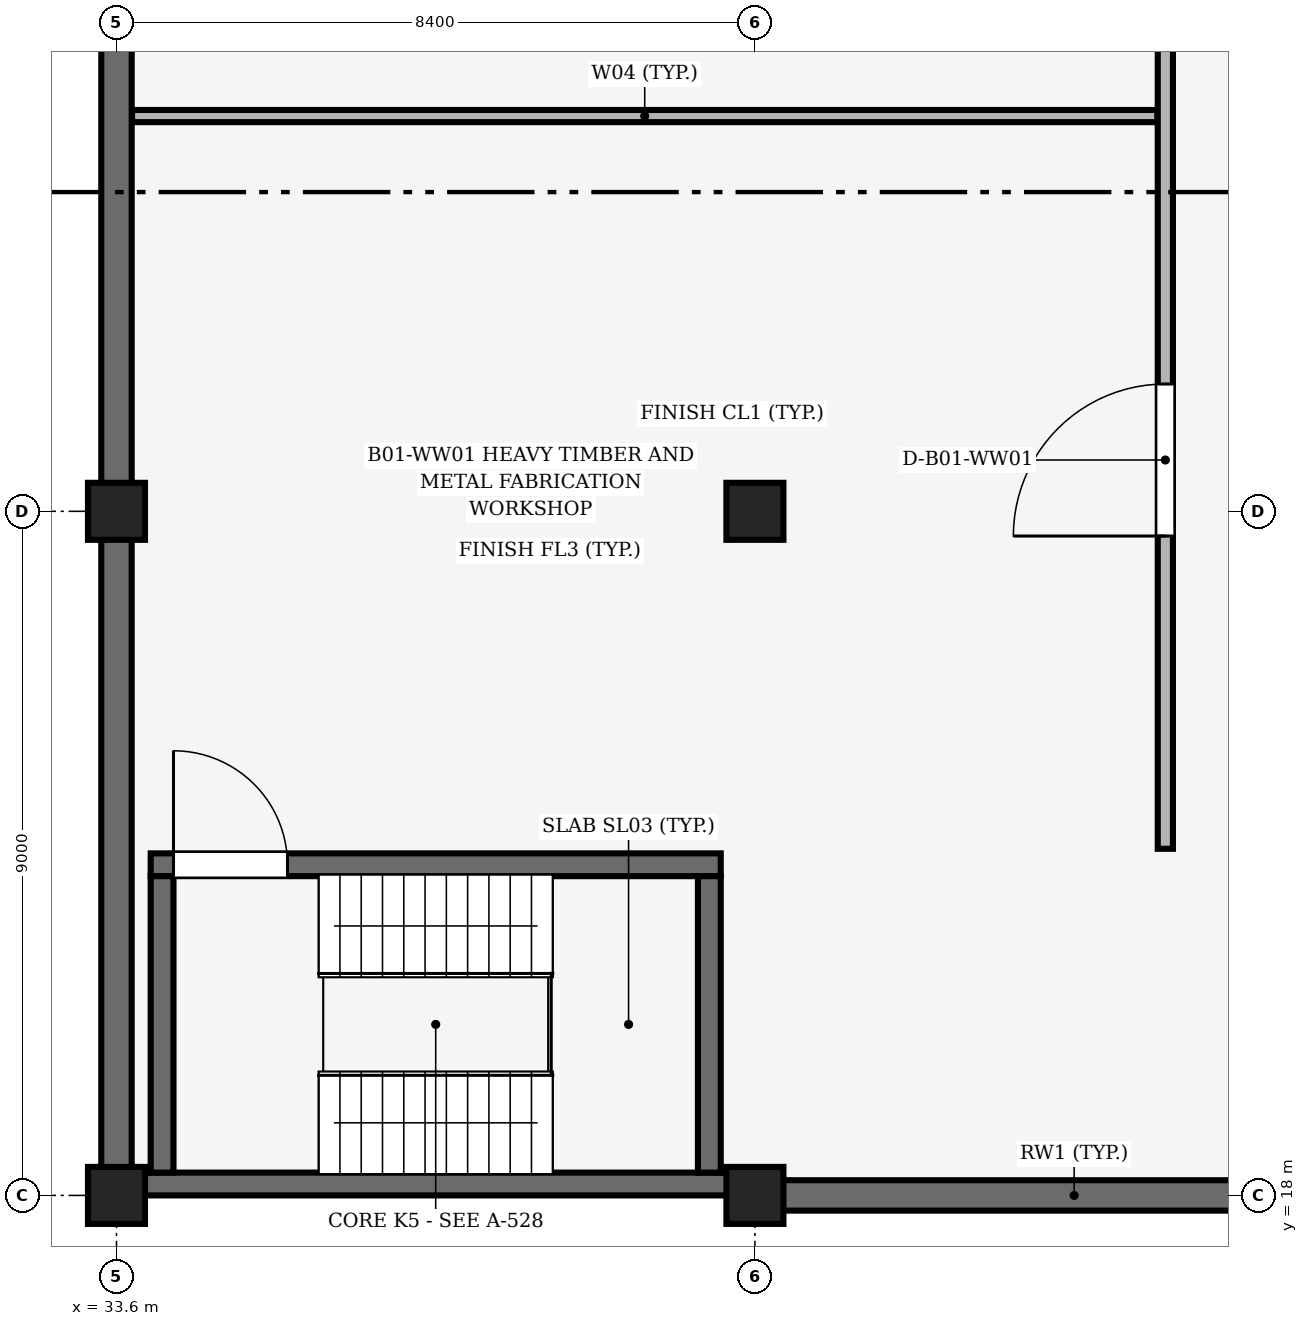
"""IFC4 building model, lengths in metres.
Left out: names, types, materials, properties, quantities, classifications, styles, units other than length and angle.
Written with IfcOpenShell. Run it as: python <this file> out.ifc"""

import sys

from ifc_helpers import new_model, si_unit, direction, frame, frame_2d, origin, origin_2d, place, context, subcontext, project, spatial, rectangle, extrude, element, fill, save


model = new_model("IFC4")
c1 = context("Model", 3, precision=1e-05, world=origin(), true_north=direction((0.0, 1.0)))
c2 = subcontext(c1, "Body", "Model", "MODEL_VIEW")
j1 = project(units=[si_unit("LENGTHUNIT", "METRE"), si_unit("PLANEANGLEUNIT", "RADIAN")], contexts=[c1])
p1 = place(None, origin())
s1 = spatial("IfcSite", under=j1, at=p1, CompositionType="ELEMENT")
p2 = place(p1, origin())
s2 = spatial("IfcBuilding", under=s1, at=p2, CompositionType="ELEMENT")
p3 = place(p2, frame((0.0, 0.0, -4.2)))
s3 = spatial("IfcBuildingStorey", under=s2, at=p3, CompositionType="ELEMENT", Elevation=-4.2)
for number, where, z_axis, x_axis in (
    (1, (33.6, 18.0, 0.0), (0.0, 0.0, 1.0), (1.0, 0.0, 0.0)),
    (2, (33.6, 27.0, 0.0), (0.0, 0.0, 1.0), (1.0, 0.0, 0.0)),
    (3, (42.0, 18.0, 0.0), (0.0, 0.0, 1.0), (1.0, 0.0, 0.0)),
    (4, (42.0, 27.0, 0.0), (0.0, 0.0, 1.0), (1.0, 0.0, 0.0)),
):
    element("IfcColumn", number, at=place(p3, frame(where, z_axis=z_axis, x_axis=x_axis)), inside=s3, PredefinedType="COLUMN", context=c2, shape_type="SweptSolid", body=[
        extrude(rectangle(XDim=0.75, YDim=0.75, at=origin_2d()), origin(), (0.0, 0.0, 1.0), 4.2),
    ])
p4 = place(p3, frame((42.35, 18.0, 0.0), z_axis=(0.0, 0.0, 1.0), x_axis=(1.0, 0.0, 0.0)))
e5 = element("IfcWall", 5, at=p4, inside=s3, PredefinedType="SHEAR", context=c2, shape_type="SweptSolid", body=[
    extrude(rectangle(XDim=7.7, YDim=0.4, at=frame_2d((3.85, 0.0))), origin(), (0.0, 0.0, 1.0), 2.95),
])
p5 = place(p3, frame((33.6, 18.35, 0.0), z_axis=(0.0, 0.0, 1.0), x_axis=(0.0, 1.0, 0.0)))
e6 = element("IfcWall", 6, at=p5, inside=s3, PredefinedType="SHEAR", context=c2, shape_type="SweptSolid", body=[
    extrude(rectangle(XDim=8.3, YDim=0.4, at=frame_2d((4.15, 0.0))), origin(), (0.0, 0.0, 1.0), 2.7),
])
p6 = place(p3, frame((33.6, 27.35, 0.0), z_axis=(0.0, 0.0, 1.0), x_axis=(0.0, 1.0, 0.0)))
e7 = element("IfcWall", 7, at=p6, inside=s3, PredefinedType="SHEAR", context=c2, shape_type="SweptSolid", body=[
    extrude(rectangle(XDim=7.7, YDim=0.4, at=frame_2d((3.85, 0.0))), origin(), (0.0, 0.0, 1.0), 3.25),
])
p7 = place(p3, frame((33.925, 18.15, 0.0), z_axis=(0.0, 0.0, 1.0), x_axis=(1.0, 0.0, 0.0)))
e8 = element("IfcWall", 8, at=p7, inside=s3, PredefinedType="SHEAR", context=c2, shape_type="SweptSolid", body=[
    extrude(rectangle(XDim=7.75, YDim=0.3, at=frame_2d((3.875, 0.0))), origin(), (0.0, 0.0, 1.0), 4.025),
])
p8 = place(p3, frame((34.05, 22.35, 0.0), z_axis=(0.0, 0.0, 1.0), x_axis=(1.0, 0.0, 0.0)))
e9 = element("IfcWall", 9, at=p8, inside=s3, PredefinedType="SHEAR", context=c2, shape_type="SweptSolid", body=[
    extrude(rectangle(XDim=7.5, YDim=0.3, at=frame_2d((3.75, 0.0))), origin(), (0.0, 0.0, 1.0), 4.025),
])
p9 = place(p8, frame((0.3, 0.0, 0.0)))
e10 = element("IfcOpeningElement", 10, at=p9, cuts=e9, PredefinedType="OPENING", context=c2, shape_type="SweptSolid", body=[
    extrude(rectangle(XDim=1.5, YDim=2.2, at=frame_2d((0.75, 1.1))), frame((0.0, 0.16, 0.0), z_axis=(0.0, -1.0, 0.0), x_axis=(1.0, 0.0, 0.0)), (0.0, 0.0, 1.0), 0.32),
])
for number, where, z_axis, x_axis in (
    (11, (34.2, 18.3, 0.0), (0.0, 0.0, 1.0), (0.0, 1.0, 0.0)),
    (12, (41.4, 18.3, 0.0), (0.0, 0.0, 1.0), (0.0, 1.0, 0.0)),
):
    element("IfcWall", number, at=place(p3, frame(where, z_axis=z_axis, x_axis=x_axis)), inside=s3, PredefinedType="SHEAR", context=c2, shape_type="SweptSolid", body=[
        extrude(rectangle(XDim=3.9, YDim=0.3, at=frame_2d((1.95, 0.0))), origin(), (0.0, 0.0, 1.0), 4.025),
    ])
p10 = place(p3, frame((33.805, 32.2, 0.0), z_axis=(0.0, 0.0, 1.0), x_axis=(1.0, 0.0, 0.0)))
e13 = element("IfcWall", 13, at=p10, inside=s3, PredefinedType="PARTITIONING", context=c2, shape_type="SweptSolid", body=[
    extrude(rectangle(XDim=13.49, YDim=0.16, at=frame_2d((6.745, 0.0))), origin(), (0.0, 0.0, 1.0), 3.9),
])
p11 = place(p3, frame((47.4, 22.56, 0.0), z_axis=(0.0, 0.0, 1.0), x_axis=(0.0, 1.0, 0.0)))
e14 = element("IfcWall", 14, at=p11, inside=s3, PredefinedType="PARTITIONING", context=c2, shape_type="SweptSolid", body=[
    extrude(rectangle(XDim=37.835, YDim=0.2, at=frame_2d((18.917, 0.0))), origin(), (0.0, 0.0, 1.0), 3.9),
])
p12 = place(p11, frame((4.115, 0.0, 0.0)))
e15 = element("IfcOpeningElement", 15, at=p12, cuts=e14, PredefinedType="OPENING", context=c2, shape_type="SweptSolid", body=[
    extrude(rectangle(XDim=2.0, YDim=2.5, at=frame_2d((1.0, 1.25))), frame((0.0, 0.11, 0.0), z_axis=(0.0, -1.0, 0.0), x_axis=(1.0, 0.0, 0.0)), (0.0, 0.0, 1.0), 0.22),
])
p13 = place(p11, frame((13.74, 0.0, 0.0)))
e16 = element("IfcOpeningElement", 16, at=p13, cuts=e14, PredefinedType="OPENING", context=c2, shape_type="SweptSolid", body=[
    extrude(rectangle(XDim=1.4, YDim=2.2, at=frame_2d((0.7, 1.1))), frame((0.0, 0.11, 0.0), z_axis=(0.0, -1.0, 0.0), x_axis=(1.0, 0.0, 0.0)), (0.0, 0.0, 1.0), 0.22),
])
p14 = place(p11, frame((22.29, 0.0, 0.0)))
e17 = element("IfcOpeningElement", 17, at=p14, cuts=e14, PredefinedType="OPENING", context=c2, shape_type="SweptSolid", body=[
    extrude(rectangle(XDim=1.1, YDim=2.15, at=frame_2d((0.55, 1.075))), frame((0.0, 0.11, 0.0), z_axis=(0.0, -1.0, 0.0), x_axis=(1.0, 0.0, 0.0)), (0.0, 0.0, 1.0), 0.22),
])
p15 = place(p11, frame((28.865, 0.0, 0.0)))
e18 = element("IfcOpeningElement", 18, at=p15, cuts=e14, PredefinedType="OPENING", context=c2, shape_type="SweptSolid", body=[
    extrude(rectangle(XDim=0.95, YDim=2.2, at=frame_2d((0.475, 1.1))), frame((0.0, 0.11, 0.0), z_axis=(0.0, -1.0, 0.0), x_axis=(1.0, 0.0, 0.0)), (0.0, 0.0, 1.0), 0.22),
])
p16 = place(p11, frame((34.665, 0.0, 0.0)))
e19 = element("IfcOpeningElement", 19, at=p16, cuts=e14, PredefinedType="OPENING", context=c2, shape_type="SweptSolid", body=[
    extrude(rectangle(XDim=0.95, YDim=2.2, at=frame_2d((0.475, 1.1))), frame((0.0, 0.11, 0.0), z_axis=(0.0, -1.0, 0.0), x_axis=(1.0, 0.0, 0.0)), (0.0, 0.0, 1.0), 0.22),
])
p17 = place(p9, origin())
e20 = element("IfcDoor", 20, at=p17, inside=s3, OperationType="DOUBLE_DOOR_SINGLE_SWING", PredefinedType="DOOR", context=c2, shape_type="SweptSolid", body=[
    extrude(rectangle(XDim=1.5, YDim=2.2, at=frame_2d((0.75, 1.1))), frame((0.0, 0.025, 0.0), z_axis=(0.0, -1.0, 0.0), x_axis=(1.0, 0.0, 0.0)), (0.0, 0.0, 1.0), 0.05),
])
fill(e10, e20)
p18 = place(p12, origin())
e21 = element("IfcDoor", 21, at=p18, inside=s3, OperationType="DOUBLE_DOOR_SINGLE_SWING", PredefinedType="DOOR", context=c2, shape_type="SweptSolid", body=[
    extrude(rectangle(XDim=2.0, YDim=2.5, at=frame_2d((1.0, 1.25))), frame((0.0, 0.025, 0.0), z_axis=(0.0, -1.0, 0.0), x_axis=(1.0, 0.0, 0.0)), (0.0, 0.0, 1.0), 0.05),
])
fill(e15, e21)
save(model, sys.argv[1])
